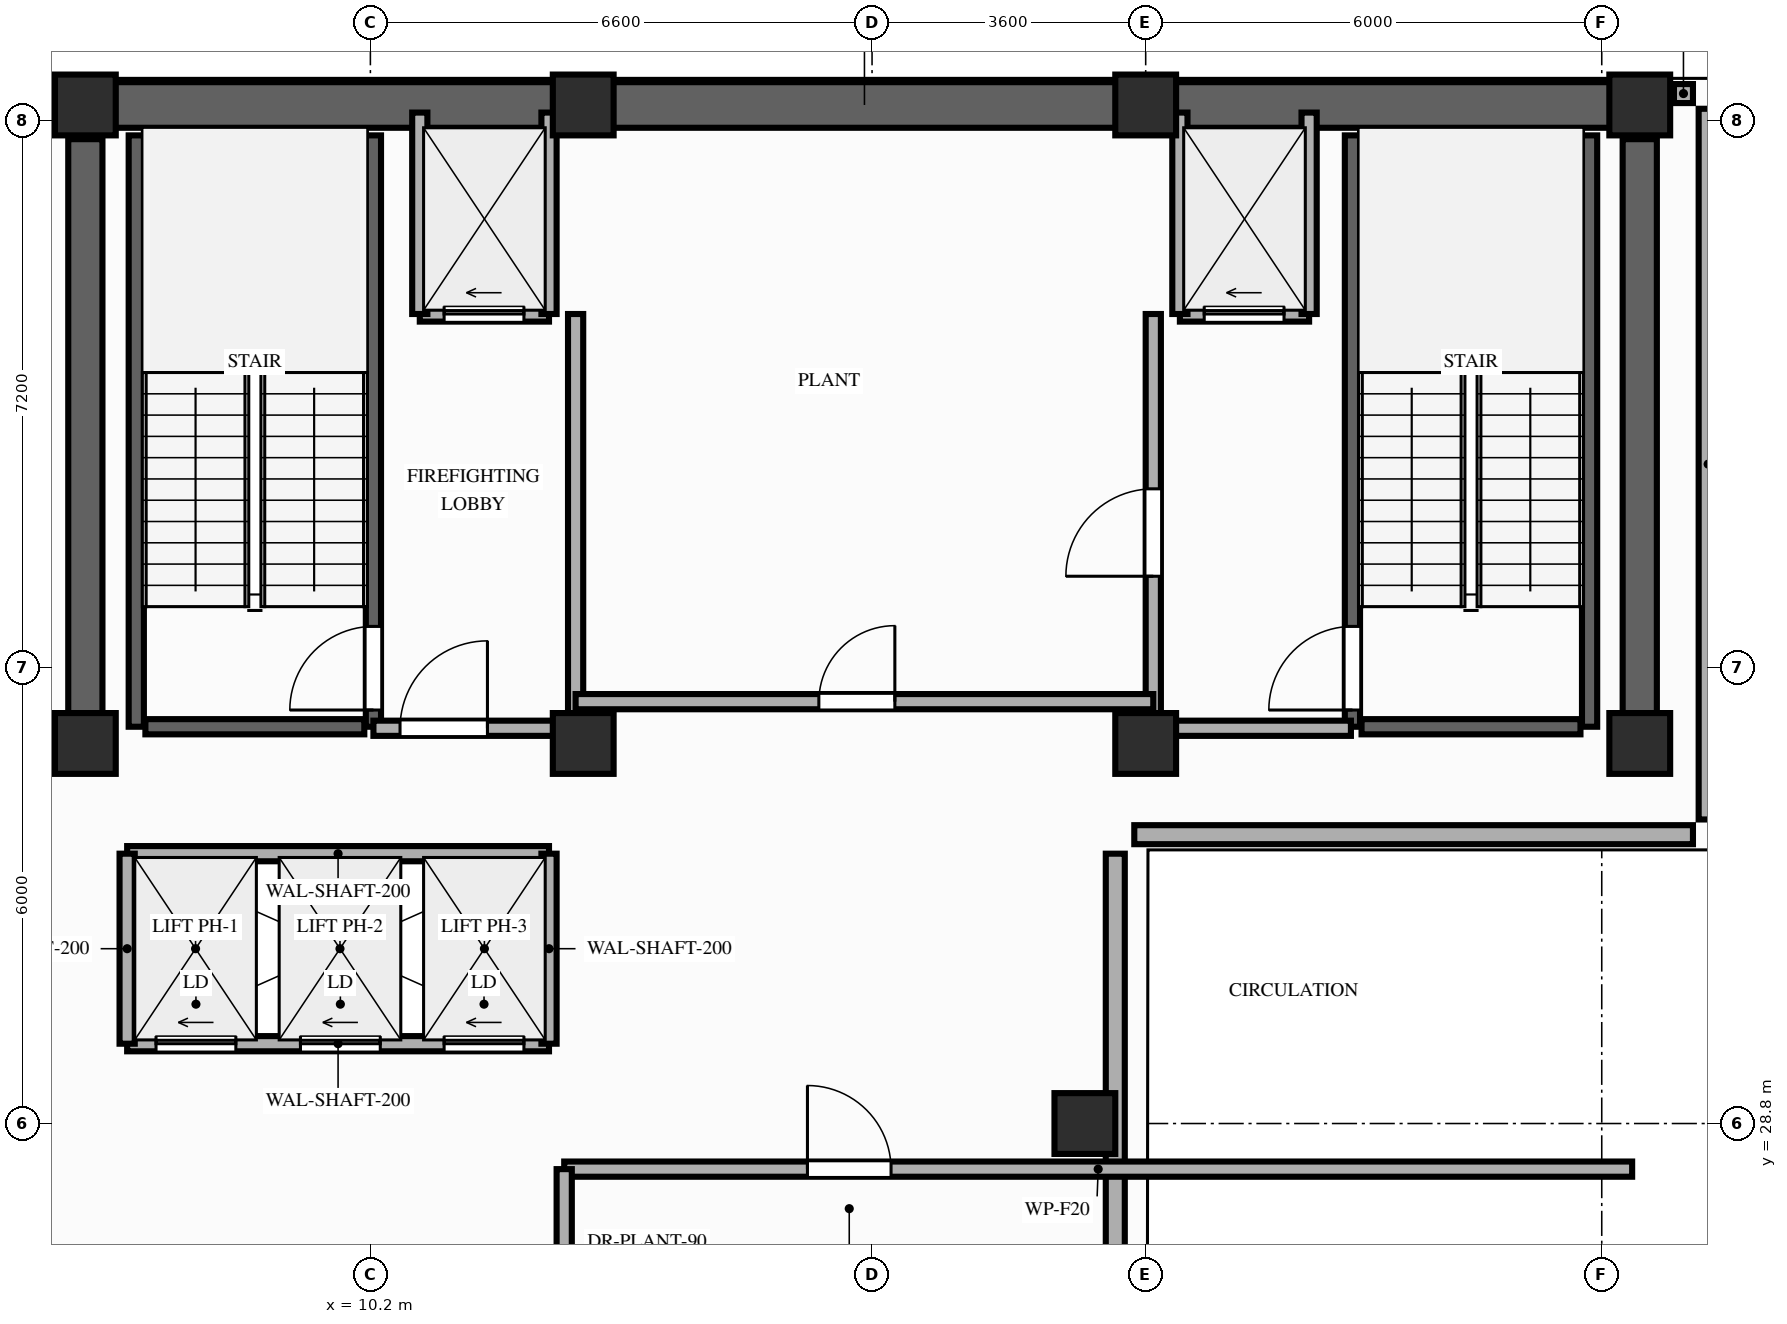
"""IFC4 building model, lengths in metres.
Left out: names, types, materials, properties, quantities, classifications, styles, units other than length and angle.
Written with IfcOpenShell. Run it as: python <this file> out.ifc"""

import sys

from ifc_helpers import new_model, si_unit, direction, frame, frame_2d, origin, origin_2d, place, context, subcontext, project, spatial, rectangle, extrude, element, fill, save


model = new_model("IFC4")
c1 = context("Model", 3, precision=1e-05, world=origin(), true_north=direction((0.0, 1.0)))
c2 = subcontext(c1, "Body", "Model", "MODEL_VIEW")
j1 = project(units=[si_unit("LENGTHUNIT", "METRE"), si_unit("PLANEANGLEUNIT", "RADIAN")], contexts=[c1])
p1 = place(None, origin())
s1 = spatial("IfcSite", under=j1, at=p1, CompositionType="ELEMENT")
p2 = place(p1, origin())
s2 = spatial("IfcBuilding", under=s1, at=p2, CompositionType="ELEMENT")
p3 = place(p2, frame((0.0, 0.0, 214.4)))
s3 = spatial("IfcBuildingStorey", under=s2, at=p3, CompositionType="ELEMENT", Elevation=214.4)
for number, where, z_axis, x_axis in (
    (1, (6.45, 33.8, 0.0), (0.0, 0.0, 1.0), (1.0, 0.0, 0.0)),
    (2, (13.0, 33.8, 0.0), (0.0, 0.0, 1.0), (1.0, 0.0, 0.0)),
    (3, (20.4, 33.8, 0.0), (0.0, 0.0, 1.0), (1.0, 0.0, 0.0)),
    (4, (26.9, 33.8, 0.0), (0.0, 0.0, 1.0), (1.0, 0.0, 0.0)),
    (5, (6.45, 42.2, 0.0), (0.0, 0.0, 1.0), (1.0, 0.0, 0.0)),
    (6, (13.0, 42.2, 0.0), (0.0, 0.0, 1.0), (1.0, 0.0, 0.0)),
    (7, (20.4, 42.2, 0.0), (0.0, 0.0, 1.0), (1.0, 0.0, 0.0)),
    (8, (26.9, 42.2, 0.0), (0.0, 0.0, 1.0), (1.0, 0.0, 0.0)),
    (9, (19.6, 28.8, 0.0), (0.0, 0.0, 1.0), (1.0, 0.0, 0.0)),
):
    element("IfcColumn", number, at=place(p3, frame(where, z_axis=z_axis, x_axis=x_axis)), inside=s3, PredefinedType="COLUMN", context=c2, shape_type="SweptSolid", body=[
        extrude(rectangle(XDim=0.8, YDim=0.8, at=origin_2d()), origin(), (0.0, 0.0, 1.0), 4.0),
    ])
p4 = place(p3, frame((20.0, 8.8, 0.0), z_axis=(0.0, 0.0, 1.0), x_axis=(0.0, 1.0, 0.0)))
e10 = element("IfcWall", 10, at=p4, inside=s3, PredefinedType="STANDARD", context=c2, shape_type="SweptSolid", body=[
    extrude(rectangle(XDim=23.55, YDim=0.25, at=frame_2d((11.775, 0.0))), origin(), (0.0, 0.0, 1.0), 3.31),
])
p5 = place(p3, frame((27.6, 42.35, 0.0), z_axis=(0.0, 0.0, 1.0), x_axis=(-1.0, 0.0, 0.0)))
e11 = element("IfcWall", 11, at=p5, inside=s3, PredefinedType="STANDARD", context=c2, shape_type="SweptSolid", body=[
    extrude(rectangle(XDim=0.25, YDim=0.25, at=frame_2d((0.125, 0.0))), origin(), (0.0, 0.0, 1.0), 3.82),
])
p6 = place(p3, frame((27.8, 32.8, 0.0), z_axis=(0.0, 0.0, 1.0), x_axis=(0.0, 1.0, 0.0)))
e12 = element("IfcWall", 12, at=p6, inside=s3, PredefinedType="STANDARD", context=c2, shape_type="SweptSolid", body=[
    extrude(rectangle(XDim=9.35, YDim=0.25, at=frame_2d((4.675, 0.0))), origin(), (0.0, 0.0, 1.0), 3.82),
])
p7 = place(p3, frame((20.25, 32.6, 0.0), z_axis=(0.0, 0.0, 1.0), x_axis=(1.0, 0.0, 0.0)))
e13 = element("IfcWall", 13, at=p7, inside=s3, PredefinedType="STANDARD", context=c2, shape_type="SweptSolid", body=[
    extrude(rectangle(XDim=7.35, YDim=0.25, at=frame_2d((3.675, 0.0))), origin(), (0.0, 0.0, 1.0), 3.31),
])
p8 = place(p3, frame((6.45, 42.2, 0.0), z_axis=(0.0, 0.0, 1.0), x_axis=(1.0, 0.0, 0.0)))
e14 = element("IfcWall", 14, at=p8, inside=s3, PredefinedType="SHEAR", context=c2, shape_type="SweptSolid", body=[
    extrude(rectangle(XDim=20.45, YDim=0.6, at=frame_2d((10.225, 0.0))), origin(), (0.0, 0.0, 1.0), 3.82),
])
for number, where, z_axis, x_axis in (
    (15, (6.45, 33.8, 0.0), (0.0, 0.0, 1.0), (0.0, 1.0, 0.0)),
    (16, (26.9, 33.8, 0.0), (0.0, 0.0, 1.0), (0.0, 1.0, 0.0)),
):
    element("IfcWall", number, at=place(p3, frame(where, z_axis=z_axis, x_axis=x_axis)), inside=s3, PredefinedType="SHEAR", context=c2, shape_type="SweptSolid", body=[
        extrude(rectangle(XDim=7.95, YDim=0.45, at=frame_2d((3.975, 0.0))), origin(), (0.0, 0.0, 1.0), 3.82),
    ])
p9 = place(p3, frame((7.12, 34.02, 0.0), z_axis=(0.0, 0.0, 1.0), x_axis=(0.0, 1.0, 0.0)))
e17 = element("IfcWall", 17, at=p9, inside=s3, PredefinedType="SHEAR", context=c2, shape_type="SweptSolid", body=[
    extrude(rectangle(XDim=7.78, YDim=0.2, at=frame_2d((3.89, 0.0))), origin(), (0.0, 0.0, 1.0), 3.82),
])
p10 = place(p3, frame((10.24, 34.02, 0.0), z_axis=(0.0, 0.0, 1.0), x_axis=(0.0, 1.0, 0.0)))
e18 = element("IfcWall", 18, at=p10, inside=s3, PredefinedType="SHEAR", context=c2, shape_type="SweptSolid", body=[
    extrude(rectangle(XDim=7.78, YDim=0.2, at=frame_2d((3.89, 0.0))), origin(), (0.0, 0.0, 1.0), 3.82),
])
p11 = place(p10, frame((0.22, 0.0, 0.0)))
e19 = element("IfcOpeningElement", 19, at=p11, cuts=e18, PredefinedType="OPENING", context=c2, shape_type="SweptSolid", body=[
    extrude(rectangle(XDim=1.1, YDim=2.15, at=frame_2d((0.55, 1.075))), frame((0.0, 0.11, 0.0), z_axis=(0.0, -1.0, 0.0), x_axis=(1.0, 0.0, 0.0)), (0.0, 0.0, 1.0), 0.22),
])
p12 = place(p3, frame((7.24, 34.02, 0.0), z_axis=(0.0, 0.0, 1.0), x_axis=(1.0, 0.0, 0.0)))
e20 = element("IfcWall", 20, at=p12, inside=s3, PredefinedType="SHEAR", context=c2, shape_type="SweptSolid", body=[
    extrude(rectangle(XDim=2.88, YDim=0.2, at=frame_2d((1.44, 0.0))), origin(), (0.0, 0.0, 1.0), 3.82),
])
p13 = place(p3, frame((23.12, 34.02, 0.0), z_axis=(0.0, 0.0, 1.0), x_axis=(0.0, 1.0, 0.0)))
e21 = element("IfcWall", 21, at=p13, inside=s3, PredefinedType="SHEAR", context=c2, shape_type="SweptSolid", body=[
    extrude(rectangle(XDim=7.78, YDim=0.2, at=frame_2d((3.89, 0.0))), origin(), (0.0, 0.0, 1.0), 3.82),
])
p14 = place(p13, frame((0.22, 0.0, 0.0)))
e22 = element("IfcOpeningElement", 22, at=p14, cuts=e21, PredefinedType="OPENING", context=c2, shape_type="SweptSolid", body=[
    extrude(rectangle(XDim=1.1, YDim=2.15, at=frame_2d((0.55, 1.075))), frame((0.0, 0.11, 0.0), z_axis=(0.0, -1.0, 0.0), x_axis=(1.0, 0.0, 0.0)), (0.0, 0.0, 1.0), 0.22),
])
p15 = place(p3, frame((26.24, 34.02, 0.0), z_axis=(0.0, 0.0, 1.0), x_axis=(0.0, 1.0, 0.0)))
e23 = element("IfcWall", 23, at=p15, inside=s3, PredefinedType="SHEAR", context=c2, shape_type="SweptSolid", body=[
    extrude(rectangle(XDim=7.78, YDim=0.2, at=frame_2d((3.89, 0.0))), origin(), (0.0, 0.0, 1.0), 3.82),
])
p16 = place(p3, frame((23.24, 34.02, 0.0), z_axis=(0.0, 0.0, 1.0), x_axis=(1.0, 0.0, 0.0)))
e24 = element("IfcWall", 24, at=p16, inside=s3, PredefinedType="SHEAR", context=c2, shape_type="SweptSolid", body=[
    extrude(rectangle(XDim=2.88, YDim=0.2, at=frame_2d((1.44, 0.0))), origin(), (0.0, 0.0, 1.0), 3.82),
])
p17 = place(p3, frame((7.0, 29.85, 0.0), z_axis=(0.0, 0.0, 1.0), x_axis=(1.0, 0.0, 0.0)))
e25 = element("IfcWall", 25, at=p17, inside=s3, PredefinedType="MOVABLE", context=c2, shape_type="SweptSolid", body=[
    extrude(rectangle(XDim=5.55, YDim=0.2, at=frame_2d((2.775, 0.0))), origin(), (0.0, 0.0, 1.0), 3.82),
])
p18 = place(p17, frame((0.38, 0.0, 0.0)))
e26 = element("IfcOpeningElement", 26, at=p18, cuts=e25, PredefinedType="OPENING", context=c2, shape_type="SweptSolid", body=[
    extrude(rectangle(XDim=1.05, YDim=2.15, at=frame_2d((0.525, 1.075))), frame((0.0, 0.11, 0.0), z_axis=(0.0, -1.0, 0.0), x_axis=(1.0, 0.0, 0.0)), (0.0, 0.0, 1.0), 0.22),
])
p19 = place(p17, frame((2.28, 0.0, 0.0)))
e27 = element("IfcOpeningElement", 27, at=p19, cuts=e25, PredefinedType="OPENING", context=c2, shape_type="SweptSolid", body=[
    extrude(rectangle(XDim=1.05, YDim=2.15, at=frame_2d((0.525, 1.075))), frame((0.0, 0.11, 0.0), z_axis=(0.0, -1.0, 0.0), x_axis=(1.0, 0.0, 0.0)), (0.0, 0.0, 1.0), 0.22),
])
p20 = place(p17, frame((4.17, 0.0, 0.0)))
e28 = element("IfcOpeningElement", 28, at=p20, cuts=e25, PredefinedType="OPENING", context=c2, shape_type="SweptSolid", body=[
    extrude(rectangle(XDim=1.05, YDim=2.15, at=frame_2d((0.525, 1.075))), frame((0.0, 0.11, 0.0), z_axis=(0.0, -1.0, 0.0), x_axis=(1.0, 0.0, 0.0)), (0.0, 0.0, 1.0), 0.22),
])
p21 = place(p3, frame((7.0, 32.35, 0.0), z_axis=(0.0, 0.0, 1.0), x_axis=(1.0, 0.0, 0.0)))
e29 = element("IfcWall", 29, at=p21, inside=s3, PredefinedType="MOVABLE", context=c2, shape_type="SweptSolid", body=[
    extrude(rectangle(XDim=5.55, YDim=0.2, at=frame_2d((2.775, 0.0))), origin(), (0.0, 0.0, 1.0), 3.82),
])
for number, where, z_axis, x_axis in (
    (30, (7.0, 29.85, 0.0), (0.0, 0.0, 1.0), (0.0, 1.0, 0.0)),
    (31, (12.55, 29.85, 0.0), (0.0, 0.0, 1.0), (0.0, 1.0, 0.0)),
):
    element("IfcWall", number, at=place(p3, frame(where, z_axis=z_axis, x_axis=x_axis)), inside=s3, PredefinedType="MOVABLE", context=c2, shape_type="SweptSolid", body=[
        extrude(rectangle(XDim=2.5, YDim=0.2, at=frame_2d((1.25, 0.0))), origin(), (0.0, 0.0, 1.0), 3.82),
    ])
p22 = place(p3, frame((10.85, 39.45, 0.0), z_axis=(0.0, 0.0, 1.0), x_axis=(1.0, 0.0, 0.0)))
e32 = element("IfcWall", 32, at=p22, inside=s3, PredefinedType="MOVABLE", context=c2, shape_type="SweptSolid", body=[
    extrude(rectangle(XDim=1.7, YDim=0.2, at=frame_2d((0.85, 0.0))), origin(), (0.0, 0.0, 1.0), 3.82),
])
p23 = place(p22, frame((0.32, 0.0, 0.0)))
e33 = element("IfcOpeningElement", 33, at=p23, cuts=e32, PredefinedType="OPENING", context=c2, shape_type="SweptSolid", body=[
    extrude(rectangle(XDim=1.05, YDim=2.15, at=frame_2d((0.525, 1.075))), frame((0.0, 0.11, 0.0), z_axis=(0.0, -1.0, 0.0), x_axis=(1.0, 0.0, 0.0)), (0.0, 0.0, 1.0), 0.22),
])
p24 = place(p3, frame((20.85, 39.45, 0.0), z_axis=(0.0, 0.0, 1.0), x_axis=(1.0, 0.0, 0.0)))
e34 = element("IfcWall", 34, at=p24, inside=s3, PredefinedType="MOVABLE", context=c2, shape_type="SweptSolid", body=[
    extrude(rectangle(XDim=1.7, YDim=0.2, at=frame_2d((0.85, 0.0))), origin(), (0.0, 0.0, 1.0), 3.82),
])
p25 = place(p24, frame((0.32, 0.0, 0.0)))
e35 = element("IfcOpeningElement", 35, at=p25, cuts=e34, PredefinedType="OPENING", context=c2, shape_type="SweptSolid", body=[
    extrude(rectangle(XDim=1.05, YDim=2.15, at=frame_2d((0.525, 1.075))), frame((0.0, 0.11, 0.0), z_axis=(0.0, -1.0, 0.0), x_axis=(1.0, 0.0, 0.0)), (0.0, 0.0, 1.0), 0.22),
])
for number, where, z_axis, x_axis in (
    (36, (10.85, 39.45, 0.0), (0.0, 0.0, 1.0), (0.0, 1.0, 0.0)),
    (37, (12.55, 39.45, 0.0), (0.0, 0.0, 1.0), (0.0, 1.0, 0.0)),
):
    element("IfcWall", number, at=place(p3, frame(where, z_axis=z_axis, x_axis=x_axis)), inside=s3, PredefinedType="MOVABLE", context=c2, shape_type="SweptSolid", body=[
        extrude(rectangle(XDim=2.65, YDim=0.2, at=frame_2d((1.325, 0.0))), origin(), (0.0, 0.0, 1.0), 3.31),
    ])
p26 = place(p3, frame((12.9, 34.0, 0.0), z_axis=(0.0, 0.0, 1.0), x_axis=(0.0, 1.0, 0.0)))
e38 = element("IfcWall", 38, at=p26, inside=s3, PredefinedType="PARTITIONING", context=c2, shape_type="SweptSolid", body=[
    extrude(rectangle(XDim=5.45, YDim=0.2, at=frame_2d((2.725, 0.0))), origin(), (0.0, 0.0, 1.0), 3.31),
])
p27 = place(p3, frame((10.24, 34.0, 0.0), z_axis=(0.0, 0.0, 1.0), x_axis=(1.0, 0.0, 0.0)))
e39 = element("IfcWall", 39, at=p27, inside=s3, PredefinedType="PARTITIONING", context=c2, shape_type="SweptSolid", body=[
    extrude(rectangle(XDim=2.66, YDim=0.2, at=frame_2d((1.33, 0.0))), origin(), (0.0, 0.0, 1.0), 3.31),
])
p28 = place(p27, frame((0.35, 0.0, 0.0)))
e40 = element("IfcOpeningElement", 40, at=p28, cuts=e39, PredefinedType="OPENING", context=c2, shape_type="SweptSolid", body=[
    extrude(rectangle(XDim=1.15, YDim=2.15, at=frame_2d((0.575, 1.075))), frame((0.0, 0.11, 0.0), z_axis=(0.0, -1.0, 0.0), x_axis=(1.0, 0.0, 0.0)), (0.0, 0.0, 1.0), 0.22),
])
for number, where, z_axis, x_axis in (
    (41, (20.85, 39.45, 0.0), (0.0, 0.0, 1.0), (0.0, 1.0, 0.0)),
    (42, (22.55, 39.45, 0.0), (0.0, 0.0, 1.0), (0.0, 1.0, 0.0)),
):
    element("IfcWall", number, at=place(p3, frame(where, z_axis=z_axis, x_axis=x_axis)), inside=s3, PredefinedType="MOVABLE", context=c2, shape_type="SweptSolid", body=[
        extrude(rectangle(XDim=2.65, YDim=0.2, at=frame_2d((1.325, 0.0))), origin(), (0.0, 0.0, 1.0), 3.31),
    ])
p29 = place(p3, frame((20.5, 34.0, 0.0), z_axis=(0.0, 0.0, 1.0), x_axis=(0.0, 1.0, 0.0)))
e43 = element("IfcWall", 43, at=p29, inside=s3, PredefinedType="PARTITIONING", context=c2, shape_type="SweptSolid", body=[
    extrude(rectangle(XDim=5.45, YDim=0.2, at=frame_2d((2.725, 0.0))), origin(), (0.0, 0.0, 1.0), 3.31),
])
p30 = place(p29, frame((2.0, 0.0, 0.0)))
e44 = element("IfcOpeningElement", 44, at=p30, cuts=e43, PredefinedType="OPENING", context=c2, shape_type="SweptSolid", body=[
    extrude(rectangle(XDim=1.15, YDim=2.15, at=frame_2d((0.575, 1.075))), frame((0.0, 0.11, 0.0), z_axis=(0.0, -1.0, 0.0), x_axis=(1.0, 0.0, 0.0)), (0.0, 0.0, 1.0), 0.22),
])
p31 = place(p3, frame((20.5, 34.0, 0.0), z_axis=(0.0, 0.0, 1.0), x_axis=(1.0, 0.0, 0.0)))
e45 = element("IfcWall", 45, at=p31, inside=s3, PredefinedType="PARTITIONING", context=c2, shape_type="SweptSolid", body=[
    extrude(rectangle(XDim=2.6, YDim=0.2, at=frame_2d((1.3, 0.0))), origin(), (0.0, 0.0, 1.0), 3.31),
])
p32 = place(p3, frame((12.9, 34.35, 0.0), z_axis=(0.0, 0.0, 1.0), x_axis=(1.0, 0.0, 0.0)))
e46 = element("IfcWall", 46, at=p32, inside=s3, PredefinedType="PARTITIONING", context=c2, shape_type="SweptSolid", body=[
    extrude(rectangle(XDim=7.6, YDim=0.2, at=frame_2d((3.8, 0.0))), origin(), (0.0, 0.0, 1.0), 3.82),
])
p33 = place(p32, frame((3.2, 0.0, 0.0)))
e47 = element("IfcOpeningElement", 47, at=p33, cuts=e46, PredefinedType="OPENING", context=c2, shape_type="SweptSolid", body=[
    extrude(rectangle(XDim=1.0, YDim=2.15, at=frame_2d((0.5, 1.075))), frame((0.0, 0.11, 0.0), z_axis=(0.0, -1.0, 0.0), x_axis=(1.0, 0.0, 0.0)), (0.0, 0.0, 1.0), 0.22),
])
p34 = place(p3, frame((12.75, 28.2, 0.0), z_axis=(0.0, 0.0, 1.0), x_axis=(1.0, 0.0, 0.0)))
e48 = element("IfcWall", 48, at=p34, inside=s3, PredefinedType="PARTITIONING", context=c2, shape_type="SweptSolid", body=[
    extrude(rectangle(XDim=14.05, YDim=0.2, at=frame_2d((7.025, 0.0))), origin(), (0.0, 0.0, 1.0), 3.31),
])
p35 = place(p34, frame((3.2, 0.0, 0.0)))
e49 = element("IfcOpeningElement", 49, at=p35, cuts=e48, PredefinedType="OPENING", context=c2, shape_type="SweptSolid", body=[
    extrude(rectangle(XDim=1.1, YDim=2.15, at=frame_2d((0.55, 1.075))), frame((0.0, 0.11, 0.0), z_axis=(0.0, -1.0, 0.0), x_axis=(1.0, 0.0, 0.0)), (0.0, 0.0, 1.0), 0.22),
])
p36 = place(p3, frame((12.75, 8.75, 0.0), z_axis=(0.0, 0.0, 1.0), x_axis=(0.0, 1.0, 0.0)))
e50 = element("IfcWall", 50, at=p36, inside=s3, PredefinedType="PARTITIONING", context=c2, shape_type="SweptSolid", body=[
    extrude(rectangle(XDim=19.45, YDim=0.2, at=frame_2d((9.725, 0.0))), origin(), (0.0, 0.0, 1.0), 3.31),
])
p37 = place(p36, frame((16.85, 0.0, 0.0)))
e51 = element("IfcOpeningElement", 51, at=p37, cuts=e50, PredefinedType="OPENING", context=c2, shape_type="SweptSolid", body=[
    extrude(rectangle(XDim=1.4, YDim=2.2, at=frame_2d((0.7, 1.1))), frame((0.0, 0.11, 0.0), z_axis=(0.0, -1.0, 0.0), x_axis=(1.0, 0.0, 0.0)), (0.0, 0.0, 1.0), 0.22),
])
p38 = place(p11, origin())
e52 = element("IfcDoor", 52, at=p38, inside=s3, OperationType="SINGLE_SWING_LEFT", PredefinedType="DOOR", context=c2, shape_type="SweptSolid", body=[
    extrude(rectangle(XDim=1.1, YDim=2.15, at=frame_2d((0.55, 1.075))), frame((0.0, 0.025, 0.0), z_axis=(0.0, -1.0, 0.0), x_axis=(1.0, 0.0, 0.0)), (0.0, 0.0, 1.0), 0.05),
])
fill(e19, e52)
p39 = place(p14, origin())
e53 = element("IfcDoor", 53, at=p39, inside=s3, OperationType="SINGLE_SWING_LEFT", PredefinedType="DOOR", context=c2, shape_type="SweptSolid", body=[
    extrude(rectangle(XDim=1.1, YDim=2.15, at=frame_2d((0.55, 1.075))), frame((0.0, 0.025, 0.0), z_axis=(0.0, -1.0, 0.0), x_axis=(1.0, 0.0, 0.0)), (0.0, 0.0, 1.0), 0.05),
])
fill(e22, e53)
p40 = place(p18, origin())
e54 = element("IfcDoor", 54, at=p40, inside=s3, OperationType="SLIDING_TO_LEFT", PredefinedType="DOOR", context=c2, shape_type="SweptSolid", body=[
    extrude(rectangle(XDim=1.05, YDim=2.15, at=frame_2d((0.525, 1.075))), frame((0.0, 0.025, 0.0), z_axis=(0.0, -1.0, 0.0), x_axis=(1.0, 0.0, 0.0)), (0.0, 0.0, 1.0), 0.05),
])
fill(e26, e54)
p41 = place(p19, origin())
e55 = element("IfcDoor", 55, at=p41, inside=s3, OperationType="SLIDING_TO_LEFT", PredefinedType="DOOR", context=c2, shape_type="SweptSolid", body=[
    extrude(rectangle(XDim=1.05, YDim=2.15, at=frame_2d((0.525, 1.075))), frame((0.0, 0.025, 0.0), z_axis=(0.0, -1.0, 0.0), x_axis=(1.0, 0.0, 0.0)), (0.0, 0.0, 1.0), 0.05),
])
fill(e27, e55)
p42 = place(p20, origin())
e56 = element("IfcDoor", 56, at=p42, inside=s3, OperationType="SLIDING_TO_LEFT", PredefinedType="DOOR", context=c2, shape_type="SweptSolid", body=[
    extrude(rectangle(XDim=1.05, YDim=2.15, at=frame_2d((0.525, 1.075))), frame((0.0, 0.025, 0.0), z_axis=(0.0, -1.0, 0.0), x_axis=(1.0, 0.0, 0.0)), (0.0, 0.0, 1.0), 0.05),
])
fill(e28, e56)
p43 = place(p23, origin())
e57 = element("IfcDoor", 57, at=p43, inside=s3, OperationType="SLIDING_TO_LEFT", PredefinedType="DOOR", context=c2, shape_type="SweptSolid", body=[
    extrude(rectangle(XDim=1.05, YDim=2.15, at=frame_2d((0.525, 1.075))), frame((0.0, 0.025, 0.0), z_axis=(0.0, -1.0, 0.0), x_axis=(1.0, 0.0, 0.0)), (0.0, 0.0, 1.0), 0.05),
])
fill(e33, e57)
p44 = place(p25, origin())
e58 = element("IfcDoor", 58, at=p44, inside=s3, OperationType="SLIDING_TO_LEFT", PredefinedType="DOOR", context=c2, shape_type="SweptSolid", body=[
    extrude(rectangle(XDim=1.05, YDim=2.15, at=frame_2d((0.525, 1.075))), frame((0.0, 0.025, 0.0), z_axis=(0.0, -1.0, 0.0), x_axis=(1.0, 0.0, 0.0)), (0.0, 0.0, 1.0), 0.05),
])
fill(e35, e58)
p45 = place(p28, origin())
e59 = element("IfcDoor", 59, at=p45, inside=s3, OperationType="SINGLE_SWING_RIGHT", PredefinedType="DOOR", context=c2, shape_type="SweptSolid", body=[
    extrude(rectangle(XDim=1.15, YDim=2.15, at=frame_2d((0.575, 1.075))), frame((0.0, 0.025, 0.0), z_axis=(0.0, -1.0, 0.0), x_axis=(1.0, 0.0, 0.0)), (0.0, 0.0, 1.0), 0.05),
])
fill(e40, e59)
p46 = place(p30, origin())
e60 = element("IfcDoor", 60, at=p46, inside=s3, OperationType="SINGLE_SWING_LEFT", PredefinedType="DOOR", context=c2, shape_type="SweptSolid", body=[
    extrude(rectangle(XDim=1.15, YDim=2.15, at=frame_2d((0.575, 1.075))), frame((0.0, 0.025, 0.0), z_axis=(0.0, -1.0, 0.0), x_axis=(1.0, 0.0, 0.0)), (0.0, 0.0, 1.0), 0.05),
])
fill(e44, e60)
p47 = place(p33, origin())
e61 = element("IfcDoor", 61, at=p47, inside=s3, OperationType="SINGLE_SWING_RIGHT", PredefinedType="DOOR", context=c2, shape_type="SweptSolid", body=[
    extrude(rectangle(XDim=1.0, YDim=2.15, at=frame_2d((0.5, 1.075))), frame((0.0, 0.025, 0.0), z_axis=(0.0, -1.0, 0.0), x_axis=(1.0, 0.0, 0.0)), (0.0, 0.0, 1.0), 0.05),
])
fill(e47, e61)
p48 = place(p35, origin())
e62 = element("IfcDoor", 62, at=p48, inside=s3, OperationType="SINGLE_SWING_LEFT", PredefinedType="DOOR", context=c2, shape_type="SweptSolid", body=[
    extrude(rectangle(XDim=1.1, YDim=2.15, at=frame_2d((0.55, 1.075))), frame((0.0, 0.025, 0.0), z_axis=(0.0, -1.0, 0.0), x_axis=(1.0, 0.0, 0.0)), (0.0, 0.0, 1.0), 0.05),
])
fill(e49, e62)
save(model, sys.argv[1])
